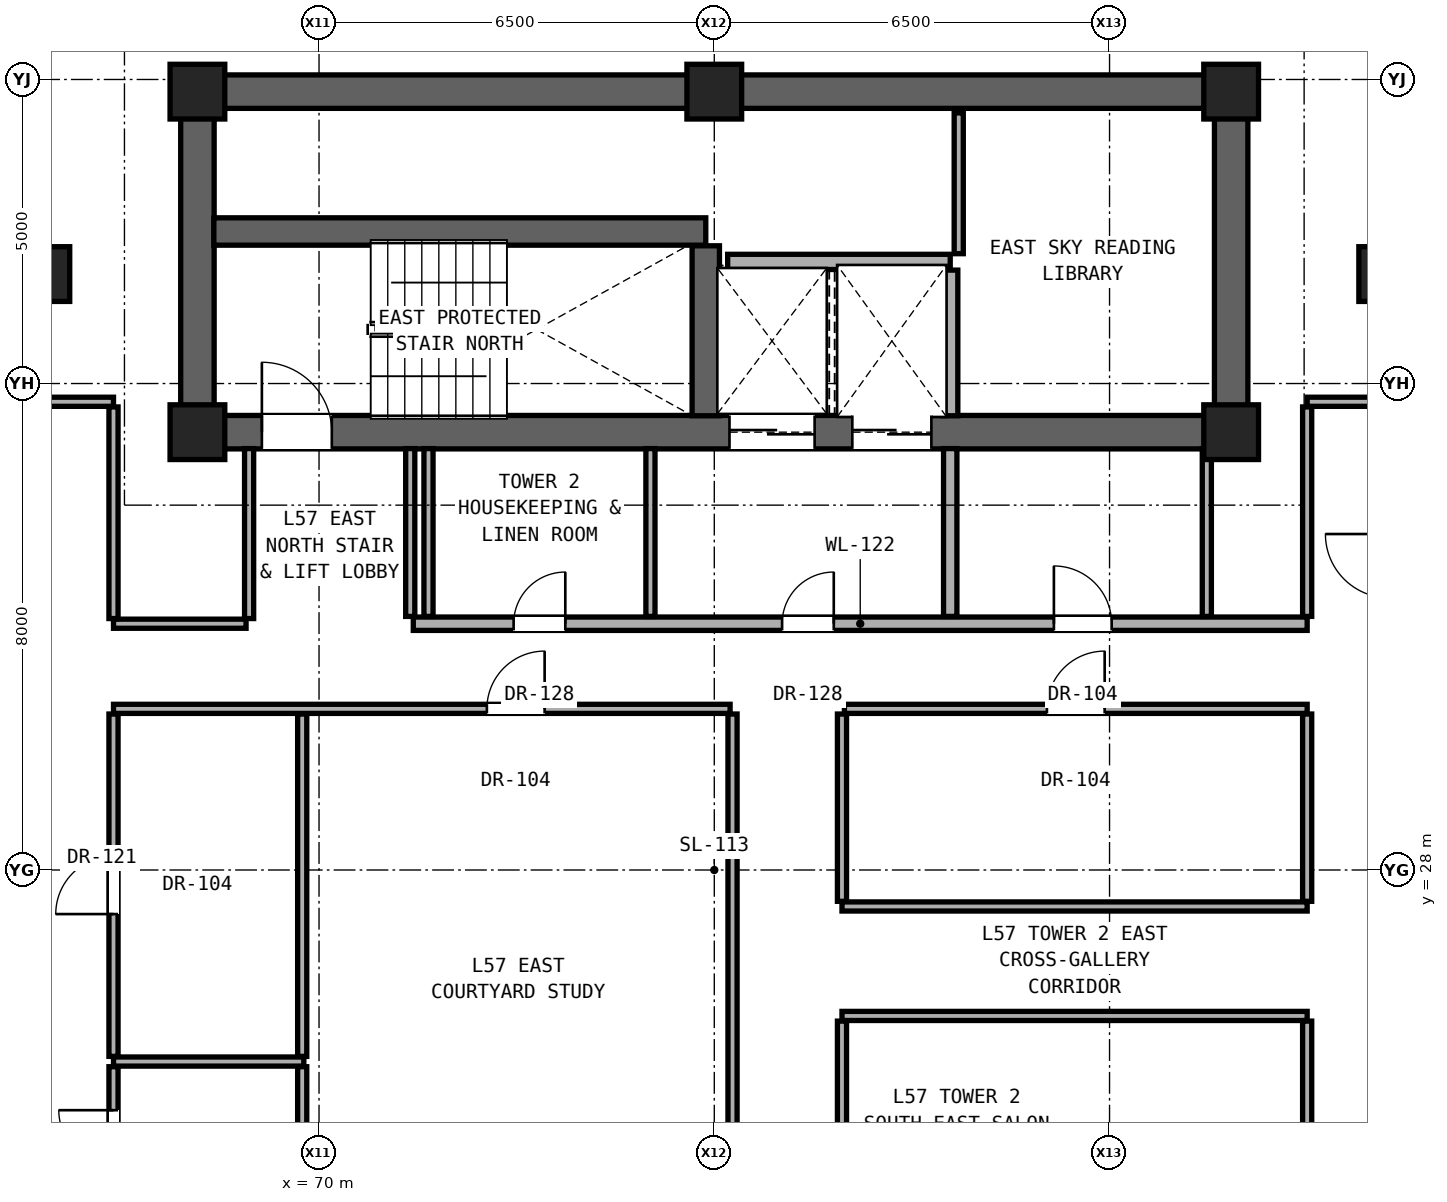
"""IFC4 building model, lengths in metres.
Left out: names, types, materials, properties, quantities, classifications, styles, units other than length and angle.
Written with IfcOpenShell. Run it as: python <this file> out.ifc"""

import sys

from ifc_helpers import new_model, si_unit, direction, frame, frame_2d, origin, origin_2d, place, context, subcontext, project, spatial, rectangle, extrude, element, fill, save


model = new_model("IFC4")
c1 = context("Model", 3, precision=1e-05, world=origin(), true_north=direction((0.0, 1.0)))
c2 = subcontext(c1, "Body", "Model", "MODEL_VIEW")
j1 = project(units=[si_unit("LENGTHUNIT", "METRE"), si_unit("PLANEANGLEUNIT", "RADIAN")], contexts=[c1])
p1 = place(None, origin())
s1 = spatial("IfcSite", under=j1, at=p1, CompositionType="ELEMENT")
p2 = place(p1, origin())
s2 = spatial("IfcBuilding", under=s1, at=p2, CompositionType="ELEMENT")
p3 = place(p2, frame((0.0, 0.0, 199.9)))
s3 = spatial("IfcBuildingStorey", under=s2, at=p3, CompositionType="ELEMENT", Elevation=199.9)
for number, where, z_axis, x_axis in (
    (1, (68.0, 35.2, 0.0), (0.0, 0.0, 1.0), (1.0, 0.0, 0.0)),
    (2, (85.0, 35.2, 0.0), (0.0, 0.0, 1.0), (1.0, 0.0, 0.0)),
    (3, (68.0, 40.8, 0.0), (0.0, 0.0, 1.0), (1.0, 0.0, 0.0)),
    (4, (76.5, 40.8, 0.0), (0.0, 0.0, 1.0), (1.0, 0.0, 0.0)),
    (5, (85.0, 40.8, 0.0), (0.0, 0.0, 1.0), (1.0, 0.0, 0.0)),
):
    element("IfcColumn", number, at=place(p3, frame(where, z_axis=z_axis, x_axis=x_axis)), inside=s3, PredefinedType="COLUMN", context=c2, shape_type="SweptSolid", body=[
        extrude(rectangle(XDim=0.9, YDim=0.9, at=origin_2d()), origin(), (0.0, 0.0, 1.0), 3.25),
    ])
for number, where, z_axis, x_axis in (
    (6, (65.6, 37.8, 0.0), (0.0, 0.0, 1.0), (1.0, 0.0, 0.0)),
    (7, (87.4, 37.8, 0.0), (0.0, 0.0, 1.0), (1.0, 0.0, 0.0)),
):
    element("IfcColumn", number, at=place(p3, frame(where, z_axis=z_axis, x_axis=x_axis)), inside=s3, PredefinedType="PILASTER", context=c2, shape_type="SweptSolid", body=[
        extrude(rectangle(XDim=0.6, YDim=0.9, at=origin_2d()), origin(), (0.0, 0.0, 1.0), 3.25),
    ])
p4 = place(p3, frame((68.0, 40.8, 0.0), z_axis=(0.0, 0.0, 1.0), x_axis=(1.0, 0.0, 0.0)))
e8 = element("IfcWall", 8, at=p4, inside=s3, PredefinedType="SHEAR", context=c2, shape_type="SweptSolid", body=[
    extrude(rectangle(XDim=17.0, YDim=0.55, at=frame_2d((8.5, 0.0))), origin(), (0.0, 0.0, 1.0), 3.05),
])
for number, where, z_axis, x_axis in (
    (9, (68.0, 35.2, 0.0), (0.0, 0.0, 1.0), (0.0, 1.0, 0.0)),
    (10, (85.0, 35.2, 0.0), (0.0, 0.0, 1.0), (0.0, 1.0, 0.0)),
):
    element("IfcWall", number, at=place(p3, frame(where, z_axis=z_axis, x_axis=x_axis)), inside=s3, PredefinedType="SHEAR", context=c2, shape_type="SweptSolid", body=[
        extrude(rectangle(XDim=5.6, YDim=0.55, at=frame_2d((2.8, 0.0))), origin(), (0.0, 0.0, 1.0), 3.05),
    ])
p5 = place(p3, frame((68.0, 35.2, 0.0), z_axis=(0.0, 0.0, 1.0), x_axis=(1.0, 0.0, 0.0)))
e11 = element("IfcWall", 11, at=p5, inside=s3, PredefinedType="SHEAR", context=c2, shape_type="SweptSolid", body=[
    extrude(rectangle(XDim=17.0, YDim=0.55, at=frame_2d((8.5, 0.0))), origin(), (0.0, 0.0, 1.0), 3.05),
])
p6 = place(p5, frame((1.06, 0.0, 0.0)))
e12 = element("IfcOpeningElement", 12, at=p6, cuts=e11, PredefinedType="OPENING", context=c2, shape_type="SweptSolid", body=[
    extrude(rectangle(XDim=1.15, YDim=2.2, at=frame_2d((0.575, 1.1))), frame((0.0, 0.285, 0.0), z_axis=(0.0, -1.0, 0.0), x_axis=(1.0, 0.0, 0.0)), (0.0, 0.0, 1.0), 0.57),
])
p7 = place(p5, frame((8.75, 0.0, 0.0)))
e13 = element("IfcOpeningElement", 13, at=p7, cuts=e11, PredefinedType="OPENING", context=c2, shape_type="SweptSolid", body=[
    extrude(rectangle(XDim=1.4, YDim=2.35, at=frame_2d((0.7, 1.175))), frame((0.0, 0.285, 0.0), z_axis=(0.0, -1.0, 0.0), x_axis=(1.0, 0.0, 0.0)), (0.0, 0.0, 1.0), 0.57),
])
p8 = place(p5, frame((10.77, 0.0, 0.0)))
e14 = element("IfcOpeningElement", 14, at=p8, cuts=e11, PredefinedType="OPENING", context=c2, shape_type="SweptSolid", body=[
    extrude(rectangle(XDim=1.3, YDim=2.3, at=frame_2d((0.65, 1.15))), frame((0.0, 0.285, 0.0), z_axis=(0.0, -1.0, 0.0), x_axis=(1.0, 0.0, 0.0)), (0.0, 0.0, 1.0), 0.57),
])
p9 = place(p3, frame((66.62, 24.85, 0.0), z_axis=(0.0, 0.0, 1.0), x_axis=(1.0, 0.0, 0.0)))
e15 = element("IfcWall", 15, at=p9, inside=s3, PredefinedType="PARTITIONING", context=c2, shape_type="SweptSolid", body=[
    extrude(rectangle(XDim=3.13, YDim=0.15, at=frame_2d((1.565, 0.0))), origin(), (0.0, 0.0, 1.0), 2.186),
])
for number, where, z_axis, x_axis in (
    (16, (78.6, 25.6, 0.0), (0.0, 0.0, 1.0), (1.0, 0.0, 0.0)),
    (17, (78.6, 27.4, 0.0), (0.0, 0.0, 1.0), (1.0, 0.0, 0.0)),
):
    element("IfcWall", number, at=place(p3, frame(where, z_axis=z_axis, x_axis=x_axis)), inside=s3, PredefinedType="PARTITIONING", context=c2, shape_type="SweptSolid", body=[
        extrude(rectangle(XDim=7.65, YDim=0.15, at=frame_2d((3.825, 0.0))), origin(), (0.0, 0.0, 1.0), 2.186),
    ])
p10 = place(p3, frame((66.62, 30.65, 0.0), z_axis=(0.0, 0.0, 1.0), x_axis=(1.0, 0.0, 0.0)))
e18 = element("IfcWall", 18, at=p10, inside=s3, PredefinedType="PARTITIONING", context=c2, shape_type="SweptSolid", body=[
    extrude(rectangle(XDim=10.14, YDim=0.15, at=frame_2d((5.07, 0.0))), origin(), (0.0, 0.0, 1.0), 2.186),
])
p11 = place(p10, frame((6.14, 0.0, 0.0)))
e19 = element("IfcOpeningElement", 19, at=p11, cuts=e18, PredefinedType="OPENING", context=c2, shape_type="SweptSolid", body=[
    extrude(rectangle(XDim=0.95, YDim=2.15, at=frame_2d((0.475, 1.075))), frame((0.0, 0.085, 0.0), z_axis=(0.0, -1.0, 0.0), x_axis=(1.0, 0.0, 0.0)), (0.0, 0.0, 1.0), 0.17),
])
p12 = place(p3, frame((78.64, 30.65, 0.0), z_axis=(0.0, 0.0, 1.0), x_axis=(1.0, 0.0, 0.0)))
e20 = element("IfcWall", 20, at=p12, inside=s3, PredefinedType="PARTITIONING", context=c2, shape_type="SweptSolid", body=[
    extrude(rectangle(XDim=7.61, YDim=0.15, at=frame_2d((3.805, 0.0))), origin(), (0.0, 0.0, 1.0), 2.186),
])
p13 = place(p12, frame((3.33, 0.0, 0.0)))
e21 = element("IfcOpeningElement", 21, at=p13, cuts=e20, PredefinedType="OPENING", context=c2, shape_type="SweptSolid", body=[
    extrude(rectangle(XDim=0.95, YDim=2.15, at=frame_2d((0.475, 1.075))), frame((0.0, 0.085, 0.0), z_axis=(0.0, -1.0, 0.0), x_axis=(1.0, 0.0, 0.0)), (0.0, 0.0, 1.0), 0.17),
])
p14 = place(p3, frame((66.62, 32.05, 0.0), z_axis=(0.0, 0.0, 1.0), x_axis=(1.0, 0.0, 0.0)))
e22 = element("IfcWall", 22, at=p14, inside=s3, PredefinedType="PARTITIONING", context=c2, shape_type="SweptSolid", body=[
    extrude(rectangle(XDim=2.18, YDim=0.15, at=frame_2d((1.09, 0.0))), origin(), (0.0, 0.0, 1.0), 2.186),
])
p15 = place(p3, frame((71.55, 32.05, 0.0), z_axis=(0.0, 0.0, 1.0), x_axis=(1.0, 0.0, 0.0)))
e23 = element("IfcWall", 23, at=p15, inside=s3, PredefinedType="SOLIDWALL", context=c2, shape_type="SweptSolid", body=[
    extrude(rectangle(XDim=14.7, YDim=0.22, at=frame_2d((7.35, 0.0))), origin(), (0.0, 0.0, 1.0), 2.186),
])
p16 = place(p15, frame((6.065, 0.0, 0.0)))
e24 = element("IfcOpeningElement", 24, at=p16, cuts=e23, PredefinedType="OPENING", context=c2, shape_type="SweptSolid", body=[
    extrude(rectangle(XDim=0.85, YDim=2.01, at=frame_2d((0.425, 1.005))), frame((0.0, 0.12, 0.0), z_axis=(0.0, -1.0, 0.0), x_axis=(1.0, 0.0, 0.0)), (0.0, 0.0, 1.0), 0.24),
])
p17 = place(p15, frame((10.535, 0.0, 0.0)))
e25 = element("IfcOpeningElement", 25, at=p17, cuts=e23, PredefinedType="OPENING", context=c2, shape_type="SweptSolid", body=[
    extrude(rectangle(XDim=0.95, YDim=2.15, at=frame_2d((0.475, 1.075))), frame((0.0, 0.12, 0.0), z_axis=(0.0, -1.0, 0.0), x_axis=(1.0, 0.0, 0.0)), (0.0, 0.0, 1.0), 0.24),
])
p18 = place(p15, frame((1.65, 0.0, 0.0)))
e26 = element("IfcOpeningElement", 26, at=p18, cuts=e23, PredefinedType="OPENING", context=c2, shape_type="SweptSolid", body=[
    extrude(rectangle(XDim=0.85, YDim=2.01, at=frame_2d((0.425, 1.005))), frame((0.0, 0.12, 0.0), z_axis=(0.0, -1.0, 0.0), x_axis=(1.0, 0.0, 0.0)), (0.0, 0.0, 1.0), 0.24),
])
p19 = place(p3, frame((65.25, 35.7, 0.0), z_axis=(0.0, 0.0, 1.0), x_axis=(1.0, 0.0, 0.0)))
e27 = element("IfcWall", 27, at=p19, inside=s3, PredefinedType="PARTITIONING", context=c2, shape_type="SweptSolid", body=[
    extrude(rectangle(XDim=1.37, YDim=0.15, at=frame_2d((0.685, 0.0))), origin(), (0.0, 0.0, 1.0), 3.05),
])
p20 = place(p3, frame((86.25, 35.7, 0.0), z_axis=(0.0, 0.0, 1.0), x_axis=(1.0, 0.0, 0.0)))
e28 = element("IfcWall", 28, at=p20, inside=s3, PredefinedType="PARTITIONING", context=c2, shape_type="SweptSolid", body=[
    extrude(rectangle(XDim=1.35, YDim=0.15, at=frame_2d((0.675, 0.0))), origin(), (0.0, 0.0, 1.0), 3.05),
])
p21 = place(p3, frame((76.72, 38.0, 0.0), z_axis=(0.0, 0.0, 1.0), x_axis=(1.0, 0.0, 0.0)))
e29 = element("IfcWall", 29, at=p21, inside=s3, PredefinedType="SOLIDWALL", context=c2, shape_type="SweptSolid", body=[
    extrude(rectangle(XDim=3.66, YDim=0.25, at=frame_2d((1.83, 0.0))), origin(), (0.0, 0.0, 1.0), 3.05),
])
p22 = place(p3, frame((68.27, 38.5, 0.0), z_axis=(0.0, 0.0, 1.0), x_axis=(1.0, 0.0, 0.0)))
e30 = element("IfcWall", 30, at=p22, inside=s3, PredefinedType="SHEAR", context=c2, shape_type="SweptSolid", body=[
    extrude(rectangle(XDim=8.09, YDim=0.45, at=frame_2d((4.045, 0.0))), origin(), (0.0, 0.0, 1.0), 3.05),
])
p23 = place(p3, frame((66.62, 22.435, 0.0), z_axis=(0.0, 0.0, 1.0), x_axis=(0.0, 1.0, 0.0)))
e31 = element("IfcWall", 31, at=p23, inside=s3, PredefinedType="PARTITIONING", context=c2, shape_type="SweptSolid", body=[
    extrude(rectangle(XDim=2.33, YDim=0.15, at=frame_2d((1.165, 0.0))), origin(), (0.0, 0.0, 1.0), 3.05),
])
p24 = place(p23, frame((0.715, 0.0, 0.0)))
e32 = element("IfcOpeningElement", 32, at=p24, cuts=e31, PredefinedType="OPENING", context=c2, shape_type="SweptSolid", body=[
    extrude(rectangle(XDim=0.9, YDim=2.1, at=frame_2d((0.45, 1.05))), frame((0.0, 0.085, 0.0), z_axis=(0.0, -1.0, 0.0), x_axis=(1.0, 0.0, 0.0)), (0.0, 0.0, 1.0), 0.17),
])
p25 = place(p3, frame((66.62, 24.935, 0.0), z_axis=(0.0, 0.0, 1.0), x_axis=(0.0, 1.0, 0.0)))
e33 = element("IfcWall", 33, at=p25, inside=s3, PredefinedType="PARTITIONING", context=c2, shape_type="SweptSolid", body=[
    extrude(rectangle(XDim=5.63, YDim=0.15, at=frame_2d((2.815, 0.0))), origin(), (0.0, 0.0, 1.0), 2.346),
])
p26 = place(p25, frame((2.34, 0.0, 0.0)))
e34 = element("IfcOpeningElement", 34, at=p26, cuts=e33, PredefinedType="OPENING", context=c2, shape_type="SweptSolid", body=[
    extrude(rectangle(XDim=0.95, YDim=2.15, at=frame_2d((0.475, 1.075))), frame((0.0, 0.085, 0.0), z_axis=(0.0, -1.0, 0.0), x_axis=(1.0, 0.0, 0.0)), (0.0, 0.0, 1.0), 0.17),
])
p27 = place(p3, frame((66.62, 32.135, 0.0), z_axis=(0.0, 0.0, 1.0), x_axis=(0.0, 1.0, 0.0)))
e35 = element("IfcWall", 35, at=p27, inside=s3, PredefinedType="PARTITIONING", context=c2, shape_type="SweptSolid", body=[
    extrude(rectangle(XDim=3.48, YDim=0.15, at=frame_2d((1.74, 0.0))), origin(), (0.0, 0.0, 1.0), 2.442),
])
p28 = place(p3, frame((68.85, 32.135, 0.0), z_axis=(0.0, 0.0, 1.0), x_axis=(0.0, 1.0, 0.0)))
e36 = element("IfcWall", 36, at=p28, inside=s3, PredefinedType="PARTITIONING", context=c2, shape_type="SweptSolid", body=[
    extrude(rectangle(XDim=2.795, YDim=0.15, at=frame_2d((1.397, 0.0))), origin(), (0.0, 0.0, 1.0), 3.05),
])
p29 = place(p3, frame((69.723, 22.435, 0.0), z_axis=(0.0, 0.0, 1.0), x_axis=(0.0, 1.0, 0.0)))
e37 = element("IfcWall", 37, at=p29, inside=s3, PredefinedType="PARTITIONING", context=c2, shape_type="SweptSolid", body=[
    extrude(rectangle(XDim=2.33, YDim=0.15, at=frame_2d((1.165, 0.0))), origin(), (0.0, 0.0, 1.0), 3.05),
])
p30 = place(p3, frame((69.723, 24.935, 0.0), z_axis=(0.0, 0.0, 1.0), x_axis=(0.0, 1.0, 0.0)))
e38 = element("IfcWall", 38, at=p30, inside=s3, PredefinedType="PARTITIONING", context=c2, shape_type="SweptSolid", body=[
    extrude(rectangle(XDim=5.63, YDim=0.15, at=frame_2d((2.815, 0.0))), origin(), (0.0, 0.0, 1.0), 2.186),
])
for number, where, z_axis, x_axis in (
    (39, (71.5, 32.17, 0.0), (0.0, 0.0, 1.0), (0.0, 1.0, 0.0)),
    (40, (71.8, 32.17, 0.0), (0.0, 0.0, 1.0), (0.0, 1.0, 0.0)),
    (41, (75.45, 32.17, 0.0), (0.0, 0.0, 1.0), (0.0, 1.0, 0.0)),
):
    element("IfcWall", number, at=place(p3, frame(where, z_axis=z_axis, x_axis=x_axis)), inside=s3, PredefinedType="PARTITIONING", context=c2, shape_type="SweptSolid", body=[
        extrude(rectangle(XDim=2.76, YDim=0.15, at=frame_2d((1.38, 0.0))), origin(), (0.0, 0.0, 1.0), 3.05),
    ])
p31 = place(p3, frame((76.36, 35.47, 0.0), z_axis=(0.0, 0.0, 1.0), x_axis=(0.0, 1.0, 0.0)))
e42 = element("IfcWall", 42, at=p31, inside=s3, PredefinedType="SHEAR", context=c2, shape_type="SweptSolid", body=[
    extrude(rectangle(XDim=2.795, YDim=0.45, at=frame_2d((1.397, 0.0))), origin(), (0.0, 0.0, 1.0), 3.05),
])
p32 = place(p3, frame((76.8, 22.435, 0.0), z_axis=(0.0, 0.0, 1.0), x_axis=(0.0, 1.0, 0.0)))
e43 = element("IfcWall", 43, at=p32, inside=s3, PredefinedType="PARTITIONING", context=c2, shape_type="SweptSolid", body=[
    extrude(rectangle(XDim=8.13, YDim=0.15, at=frame_2d((4.065, 0.0))), origin(), (0.0, 0.0, 1.0), 2.186),
])
p33 = place(p3, frame((78.6, 22.435, 0.0), z_axis=(0.0, 0.0, 1.0), x_axis=(0.0, 1.0, 0.0)))
e44 = element("IfcWall", 44, at=p33, inside=s3, PredefinedType="PARTITIONING", context=c2, shape_type="SweptSolid", body=[
    extrude(rectangle(XDim=3.08, YDim=0.15, at=frame_2d((1.54, 0.0))), origin(), (0.0, 0.0, 1.0), 3.05),
])
p34 = place(p3, frame((78.6, 27.485, 0.0), z_axis=(0.0, 0.0, 1.0), x_axis=(0.0, 1.0, 0.0)))
e45 = element("IfcWall", 45, at=p34, inside=s3, PredefinedType="PARTITIONING", context=c2, shape_type="SweptSolid", body=[
    extrude(rectangle(XDim=3.08, YDim=0.15, at=frame_2d((1.54, 0.0))), origin(), (0.0, 0.0, 1.0), 2.186),
])
p35 = place(p3, frame((80.38, 32.17, 0.0), z_axis=(0.0, 0.0, 1.0), x_axis=(0.0, 1.0, 0.0)))
e46 = element("IfcWall", 46, at=p35, inside=s3, PredefinedType="SOLIDWALL", context=c2, shape_type="SweptSolid", body=[
    extrude(rectangle(XDim=2.76, YDim=0.22, at=frame_2d((1.38, 0.0))), origin(), (0.0, 0.0, 1.0), 3.05),
])
p36 = place(p3, frame((80.38, 35.47, 0.0), z_axis=(0.0, 0.0, 1.0), x_axis=(0.0, 1.0, 0.0)))
e47 = element("IfcWall", 47, at=p36, inside=s3, PredefinedType="SOLIDWALL", context=c2, shape_type="SweptSolid", body=[
    extrude(rectangle(XDim=2.395, YDim=0.25, at=frame_2d((1.198, 0.0))), origin(), (0.0, 0.0, 1.0), 3.05),
])
p37 = place(p3, frame((80.52, 38.135, 0.0), z_axis=(0.0, 0.0, 1.0), x_axis=(0.0, 1.0, 0.0)))
e48 = element("IfcWall", 48, at=p37, inside=s3, PredefinedType="PARTITIONING", context=c2, shape_type="SweptSolid", body=[
    extrude(rectangle(XDim=2.315, YDim=0.15, at=frame_2d((1.157, 0.0))), origin(), (0.0, 0.0, 1.0), 3.05),
])
p38 = place(p3, frame((84.6, 32.17, 0.0), z_axis=(0.0, 0.0, 1.0), x_axis=(0.0, 1.0, 0.0)))
e49 = element("IfcWall", 49, at=p38, inside=s3, PredefinedType="PARTITIONING", context=c2, shape_type="SweptSolid", body=[
    extrude(rectangle(XDim=2.76, YDim=0.15, at=frame_2d((1.38, 0.0))), origin(), (0.0, 0.0, 1.0), 3.05),
])
p39 = place(p3, frame((86.25, 22.435, 0.0), z_axis=(0.0, 0.0, 1.0), x_axis=(0.0, 1.0, 0.0)))
e50 = element("IfcWall", 50, at=p39, inside=s3, PredefinedType="PARTITIONING", context=c2, shape_type="SweptSolid", body=[
    extrude(rectangle(XDim=3.08, YDim=0.15, at=frame_2d((1.54, 0.0))), origin(), (0.0, 0.0, 1.0), 3.05),
])
p40 = place(p3, frame((86.25, 27.485, 0.0), z_axis=(0.0, 0.0, 1.0), x_axis=(0.0, 1.0, 0.0)))
e51 = element("IfcWall", 51, at=p40, inside=s3, PredefinedType="PARTITIONING", context=c2, shape_type="SweptSolid", body=[
    extrude(rectangle(XDim=3.08, YDim=0.15, at=frame_2d((1.54, 0.0))), origin(), (0.0, 0.0, 1.0), 2.346),
])
p41 = place(p3, frame((86.25, 32.17, 0.0), z_axis=(0.0, 0.0, 1.0), x_axis=(0.0, 1.0, 0.0)))
e52 = element("IfcWall", 52, at=p41, inside=s3, PredefinedType="PARTITIONING", context=c2, shape_type="SweptSolid", body=[
    extrude(rectangle(XDim=3.445, YDim=0.15, at=frame_2d((1.723, 0.0))), origin(), (0.0, 0.0, 1.0), 2.442),
])
p42 = place(p6, origin())
e53 = element("IfcDoor", 53, at=p42, inside=s3, OperationType="SINGLE_SWING_LEFT", PredefinedType="DOOR", context=c2, shape_type="SweptSolid", body=[
    extrude(rectangle(XDim=1.15, YDim=2.2, at=frame_2d((0.575, 1.1))), frame((0.0, 0.025, 0.0), z_axis=(0.0, -1.0, 0.0), x_axis=(1.0, 0.0, 0.0)), (0.0, 0.0, 1.0), 0.05),
])
fill(e12, e53)
p43 = place(p16, origin())
e54 = element("IfcDoor", 54, at=p43, inside=s3, OperationType="SINGLE_SWING_RIGHT", PredefinedType="DOOR", context=c2, shape_type="SweptSolid", body=[
    extrude(rectangle(XDim=0.85, YDim=2.01, at=frame_2d((0.425, 1.005))), frame((0.0, 0.025, 0.0), z_axis=(0.0, -1.0, 0.0), x_axis=(1.0, 0.0, 0.0)), (0.0, 0.0, 1.0), 0.05),
])
fill(e24, e54)
p44 = place(p17, origin())
e55 = element("IfcDoor", 55, at=p44, inside=s3, OperationType="SINGLE_SWING_LEFT", PredefinedType="DOOR", context=c2, shape_type="SweptSolid", body=[
    extrude(rectangle(XDim=0.95, YDim=2.15, at=frame_2d((0.475, 1.075))), frame((0.0, 0.025, 0.0), z_axis=(0.0, -1.0, 0.0), x_axis=(1.0, 0.0, 0.0)), (0.0, 0.0, 1.0), 0.05),
])
fill(e25, e55)
p45 = place(p18, origin())
e56 = element("IfcDoor", 56, at=p45, inside=s3, OperationType="SINGLE_SWING_RIGHT", PredefinedType="DOOR", context=c2, shape_type="SweptSolid", body=[
    extrude(rectangle(XDim=0.85, YDim=2.01, at=frame_2d((0.425, 1.005))), frame((0.0, 0.025, 0.0), z_axis=(0.0, -1.0, 0.0), x_axis=(1.0, 0.0, 0.0)), (0.0, 0.0, 1.0), 0.05),
])
fill(e26, e56)
p46 = place(p24, origin())
e57 = element("IfcDoor", 57, at=p46, inside=s3, OperationType="SINGLE_SWING_RIGHT", PredefinedType="DOOR", context=c2, shape_type="SweptSolid", body=[
    extrude(rectangle(XDim=0.9, YDim=2.1, at=frame_2d((0.45, 1.05))), frame((0.0, 0.025, 0.0), z_axis=(0.0, -1.0, 0.0), x_axis=(1.0, 0.0, 0.0)), (0.0, 0.0, 1.0), 0.05),
])
fill(e32, e57)
p47 = place(p26, origin())
e58 = element("IfcDoor", 58, at=p47, inside=s3, OperationType="SINGLE_SWING_LEFT", PredefinedType="DOOR", context=c2, shape_type="SweptSolid", body=[
    extrude(rectangle(XDim=0.95, YDim=2.15, at=frame_2d((0.475, 1.075))), frame((0.0, 0.025, 0.0), z_axis=(0.0, -1.0, 0.0), x_axis=(1.0, 0.0, 0.0)), (0.0, 0.0, 1.0), 0.05),
])
fill(e34, e58)
p48 = place(p11, origin())
e59 = element("IfcDoor", 59, at=p48, inside=s3, OperationType="SINGLE_SWING_RIGHT", PredefinedType="DOOR", context=c2, shape_type="SweptSolid", body=[
    extrude(rectangle(XDim=0.95, YDim=2.15, at=frame_2d((0.475, 1.075))), frame((0.0, 0.025, 0.0), z_axis=(0.0, -1.0, 0.0), x_axis=(1.0, 0.0, 0.0)), (0.0, 0.0, 1.0), 0.05),
])
fill(e19, e59)
p49 = place(p13, origin())
e60 = element("IfcDoor", 60, at=p49, inside=s3, OperationType="SINGLE_SWING_RIGHT", PredefinedType="DOOR", context=c2, shape_type="SweptSolid", body=[
    extrude(rectangle(XDim=0.95, YDim=2.15, at=frame_2d((0.475, 1.075))), frame((0.0, 0.025, 0.0), z_axis=(0.0, -1.0, 0.0), x_axis=(1.0, 0.0, 0.0)), (0.0, 0.0, 1.0), 0.05),
])
fill(e21, e60)
p50 = place(p7, origin())
e61 = element("IfcDoor", 61, at=p50, inside=s3, OperationType="DOUBLE_DOOR_SLIDING", PredefinedType="DOOR", context=c2, shape_type="SweptSolid", body=[
    extrude(rectangle(XDim=1.4, YDim=2.35, at=frame_2d((0.7, 1.175))), frame((0.0, 0.025, 0.0), z_axis=(0.0, -1.0, 0.0), x_axis=(1.0, 0.0, 0.0)), (0.0, 0.0, 1.0), 0.05),
])
fill(e13, e61)
p51 = place(p8, origin())
e62 = element("IfcDoor", 62, at=p51, inside=s3, OperationType="DOUBLE_DOOR_SLIDING", PredefinedType="DOOR", context=c2, shape_type="SweptSolid", body=[
    extrude(rectangle(XDim=1.3, YDim=2.3, at=frame_2d((0.65, 1.15))), frame((0.0, 0.025, 0.0), z_axis=(0.0, -1.0, 0.0), x_axis=(1.0, 0.0, 0.0)), (0.0, 0.0, 1.0), 0.05),
])
fill(e14, e62)
save(model, sys.argv[1])
